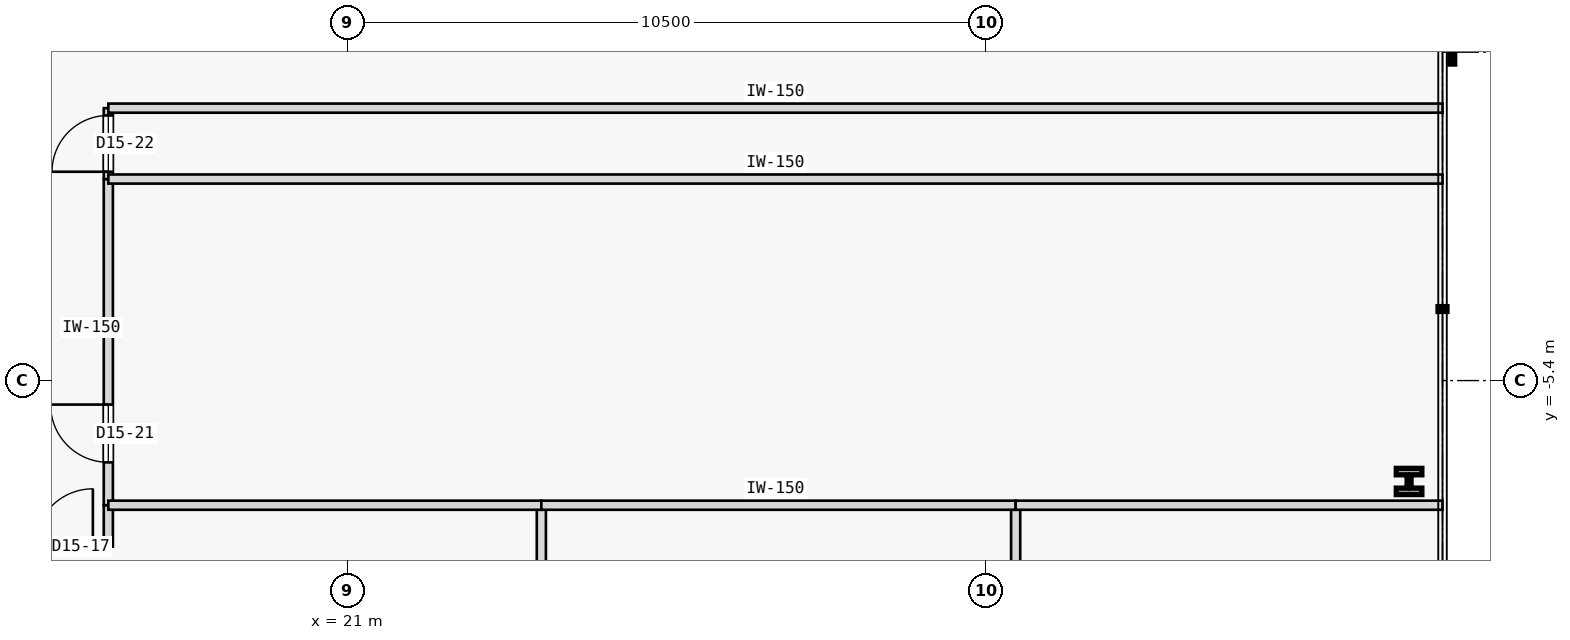
"""IFC4 building model, lengths in metres.
Left out: names, types, materials, properties, quantities, classifications, styles, units other than length and angle.
Written with IfcOpenShell. Run it as: python <this file> out.ifc"""

import sys

from ifc_helpers import new_model, si_unit, direction, frame, frame_2d, origin, origin_2d, place, context, subcontext, project, spatial, rectangle, i_section, extrude, element, fill, save


model = new_model("IFC4")
c1 = context("Model", 3, precision=1e-05, world=origin(), true_north=direction((0.0, 1.0)))
c2 = subcontext(c1, "Body", "Model", "MODEL_VIEW")
j1 = project(units=[si_unit("LENGTHUNIT", "METRE"), si_unit("PLANEANGLEUNIT", "RADIAN")], contexts=[c1])
p1 = place(None, origin())
s1 = spatial("IfcSite", under=j1, at=p1, CompositionType="ELEMENT")
p2 = place(p1, origin())
s2 = spatial("IfcBuilding", under=s1, at=p2, CompositionType="ELEMENT")
p3 = place(p2, frame((0.0, 0.0, 63.6)))
s3 = spatial("IfcBuildingStorey", under=s2, at=p3, CompositionType="ELEMENT", Elevation=63.6)
p4 = place(p3, frame((38.45, -7.059, 0.0), z_axis=(0.0, 0.0, 1.0), x_axis=(1.0, 0.0, 0.0)))
e1 = element("IfcColumn", 1, at=p4, inside=s3, PredefinedType="COLUMN", context=c2, shape_type="SweptSolid", body=[
    extrude(i_section(OverallWidth=0.42, OverallDepth=0.431, WebThickness=0.065, FlangeThickness=0.106, FilletRadius=0.015, at=origin_2d()), origin(), (0.0, 0.0, 1.0), 3.8),
])
p5 = place(p3, frame((15.6, -8.13, 0.0), z_axis=(0.0, 0.0, 1.0), x_axis=(1.0, 0.0, 0.0)))
e2 = element("IfcWall", 2, at=p5, inside=s3, PredefinedType="PARTITIONING", context=c2, shape_type="SweptSolid", body=[
    extrude(rectangle(XDim=1.459, YDim=0.15, at=frame_2d((0.729, 0.0))), origin(), (0.0, 0.0, 1.0), 3.575),
])
p6 = place(p5, frame((0.254, 0.0, 0.0)))
e3 = element("IfcOpeningElement", 3, at=p6, cuts=e2, PredefinedType="OPENING", context=c2, shape_type="SweptSolid", body=[
    extrude(rectangle(XDim=0.95, YDim=2.15, at=frame_2d((0.475, 1.075))), frame((0.0, 0.085, 0.0), z_axis=(0.0, -1.0, 0.0), x_axis=(1.0, 0.0, 0.0)), (0.0, 0.0, 1.0), 0.17),
])
p7 = place(p3, frame((17.059, -8.13, 0.0), z_axis=(0.0, 0.0, 1.0), x_axis=(0.0, 1.0, 0.0)))
e4 = element("IfcWall", 4, at=p7, inside=s3, PredefinedType="PARTITIONING", context=c2, shape_type="SweptSolid", body=[
    extrude(rectangle(XDim=0.68, YDim=0.15, at=frame_2d((0.34, 0.0))), origin(), (0.0, 0.0, 1.0), 3.575),
])
p8 = place(p3, frame((17.059, -7.45, 0.0), z_axis=(0.0, 0.0, 1.0), x_axis=(0.0, 1.0, 0.0)))
e5 = element("IfcWall", 5, at=p8, inside=s3, PredefinedType="PARTITIONING", context=c2, shape_type="SweptSolid", body=[
    extrude(rectangle(XDim=5.364, YDim=0.15, at=frame_2d((2.682, 0.0))), origin(), (0.0, 0.0, 1.0), 3.575),
])
p9 = place(p8, frame((0.705, 0.0, 0.0)))
e6 = element("IfcOpeningElement", 6, at=p9, cuts=e5, PredefinedType="OPENING", context=c2, shape_type="SweptSolid", body=[
    extrude(rectangle(XDim=0.95, YDim=2.15, at=frame_2d((0.475, 1.075))), frame((0.0, 0.085, 0.0), z_axis=(0.0, -1.0, 0.0), x_axis=(1.0, 0.0, 0.0)), (0.0, 0.0, 1.0), 0.17),
])
p10 = place(p3, frame((17.059, -2.086, 0.0), z_axis=(0.0, 0.0, 1.0), x_axis=(0.0, 1.0, 0.0)))
e7 = element("IfcWall", 7, at=p10, inside=s3, PredefinedType="PARTITIONING", context=c2, shape_type="SweptSolid", body=[
    extrude(rectangle(XDim=1.166, YDim=0.15, at=frame_2d((0.583, 0.0))), origin(), (0.0, 0.0, 1.0), 3.575),
])
p11 = place(p10, frame((0.12, 0.0, 0.0)))
e8 = element("IfcOpeningElement", 8, at=p11, cuts=e7, PredefinedType="OPENING", context=c2, shape_type="SweptSolid", body=[
    extrude(rectangle(XDim=0.926, YDim=2.15, at=frame_2d((0.463, 1.075))), frame((0.0, 0.085, 0.0), z_axis=(0.0, -1.0, 0.0), x_axis=(1.0, 0.0, 0.0)), (0.0, 0.0, 1.0), 0.17),
])
p12 = place(p3, frame((17.059, -0.92, 0.0), z_axis=(0.0, 0.0, 1.0), x_axis=(1.0, 0.0, 0.0)))
e9 = element("IfcWall", 9, at=p12, inside=s3, PredefinedType="PARTITIONING", context=c2, shape_type="SweptSolid", body=[
    extrude(rectangle(XDim=21.941, YDim=0.15, at=frame_2d((10.97, 0.0))), origin(), (0.0, 0.0, 1.0), 3.575),
])
p13 = place(p3, frame((24.18, -25.0, 0.0), z_axis=(0.0, 0.0, 1.0), x_axis=(0.0, 1.0, 0.0)))
e10 = element("IfcWall", 10, at=p13, inside=s3, PredefinedType="PARTITIONING", context=c2, shape_type="SweptSolid", body=[
    extrude(rectangle(XDim=17.55, YDim=0.15, at=frame_2d((8.775, 0.0))), origin(), (0.0, 0.0, 1.0), 3.575),
])
p14 = place(p13, frame((8.3, 0.0, 0.0)))
e11 = element("IfcOpeningElement", 11, at=p14, cuts=e10, PredefinedType="OPENING", context=c2, shape_type="SweptSolid", body=[
    extrude(rectangle(XDim=0.95, YDim=2.15, at=frame_2d((0.475, 1.075))), frame((0.0, 0.085, 0.0), z_axis=(0.0, -1.0, 0.0), x_axis=(1.0, 0.0, 0.0)), (0.0, 0.0, 1.0), 0.17),
])
p15 = place(p3, frame((17.059, -7.45, 0.0), z_axis=(0.0, 0.0, 1.0), x_axis=(1.0, 0.0, 0.0)))
e12 = element("IfcWall", 12, at=p15, inside=s3, PredefinedType="PARTITIONING", context=c2, shape_type="SweptSolid", body=[
    extrude(rectangle(XDim=7.121, YDim=0.15, at=frame_2d((3.561, 0.0))), origin(), (0.0, 0.0, 1.0), 3.575),
])
p16 = place(p3, frame((31.98, -25.0, 0.0), z_axis=(0.0, 0.0, 1.0), x_axis=(0.0, 1.0, 0.0)))
e13 = element("IfcWall", 13, at=p16, inside=s3, PredefinedType="PARTITIONING", context=c2, shape_type="SweptSolid", body=[
    extrude(rectangle(XDim=17.55, YDim=0.15, at=frame_2d((8.775, 0.0))), origin(), (0.0, 0.0, 1.0), 3.575),
])
p17 = place(p16, frame((8.3, 0.0, 0.0)))
e14 = element("IfcOpeningElement", 14, at=p17, cuts=e13, PredefinedType="OPENING", context=c2, shape_type="SweptSolid", body=[
    extrude(rectangle(XDim=0.95, YDim=2.15, at=frame_2d((0.475, 1.075))), frame((0.0, 0.085, 0.0), z_axis=(0.0, -1.0, 0.0), x_axis=(1.0, 0.0, 0.0)), (0.0, 0.0, 1.0), 0.17),
])
p18 = place(p3, frame((24.18, -7.45, 0.0), z_axis=(0.0, 0.0, 1.0), x_axis=(1.0, 0.0, 0.0)))
e15 = element("IfcWall", 15, at=p18, inside=s3, PredefinedType="PARTITIONING", context=c2, shape_type="SweptSolid", body=[
    extrude(rectangle(XDim=7.8, YDim=0.15, at=frame_2d((3.9, 0.0))), origin(), (0.0, 0.0, 1.0), 3.575),
])
p19 = place(p3, frame((31.98, -7.45, 0.0), z_axis=(0.0, 0.0, 1.0), x_axis=(1.0, 0.0, 0.0)))
e16 = element("IfcWall", 16, at=p19, inside=s3, PredefinedType="PARTITIONING", context=c2, shape_type="SweptSolid", body=[
    extrude(rectangle(XDim=7.02, YDim=0.15, at=frame_2d((3.51, 0.0))), origin(), (0.0, 0.0, 1.0), 3.575),
])
p20 = place(p3, frame((17.059, -2.086, 0.0), z_axis=(0.0, 0.0, 1.0), x_axis=(1.0, 0.0, 0.0)))
e17 = element("IfcWall", 17, at=p20, inside=s3, PredefinedType="PARTITIONING", context=c2, shape_type="SweptSolid", body=[
    extrude(rectangle(XDim=21.941, YDim=0.15, at=frame_2d((10.97, 0.0))), origin(), (0.0, 0.0, 1.0), 3.575),
])
p21 = place(p6, origin())
e18 = element("IfcDoor", 18, at=p21, inside=s3, OperationType="SINGLE_SWING_RIGHT", PredefinedType="DOOR", context=c2, shape_type="SweptSolid", body=[
    extrude(rectangle(XDim=0.95, YDim=2.15, at=frame_2d((0.475, 1.075))), frame((0.0, 0.025, 0.0), z_axis=(0.0, -1.0, 0.0), x_axis=(1.0, 0.0, 0.0)), (0.0, 0.0, 1.0), 0.05),
])
fill(e3, e18)
p22 = place(p9, origin())
e19 = element("IfcDoor", 19, at=p22, inside=s3, OperationType="SINGLE_SWING_RIGHT", PredefinedType="DOOR", context=c2, shape_type="SweptSolid", body=[
    extrude(rectangle(XDim=0.95, YDim=2.15, at=frame_2d((0.475, 1.075))), frame((0.0, 0.025, 0.0), z_axis=(0.0, -1.0, 0.0), x_axis=(1.0, 0.0, 0.0)), (0.0, 0.0, 1.0), 0.05),
])
fill(e6, e19)
p23 = place(p11, origin())
e20 = element("IfcDoor", 20, at=p23, inside=s3, OperationType="SINGLE_SWING_LEFT", PredefinedType="DOOR", context=c2, shape_type="SweptSolid", body=[
    extrude(rectangle(XDim=0.926, YDim=2.15, at=frame_2d((0.463, 1.075))), frame((0.0, 0.025, 0.0), z_axis=(0.0, -1.0, 0.0), x_axis=(1.0, 0.0, 0.0)), (0.0, 0.0, 1.0), 0.05),
])
fill(e8, e20)
save(model, sys.argv[1])
